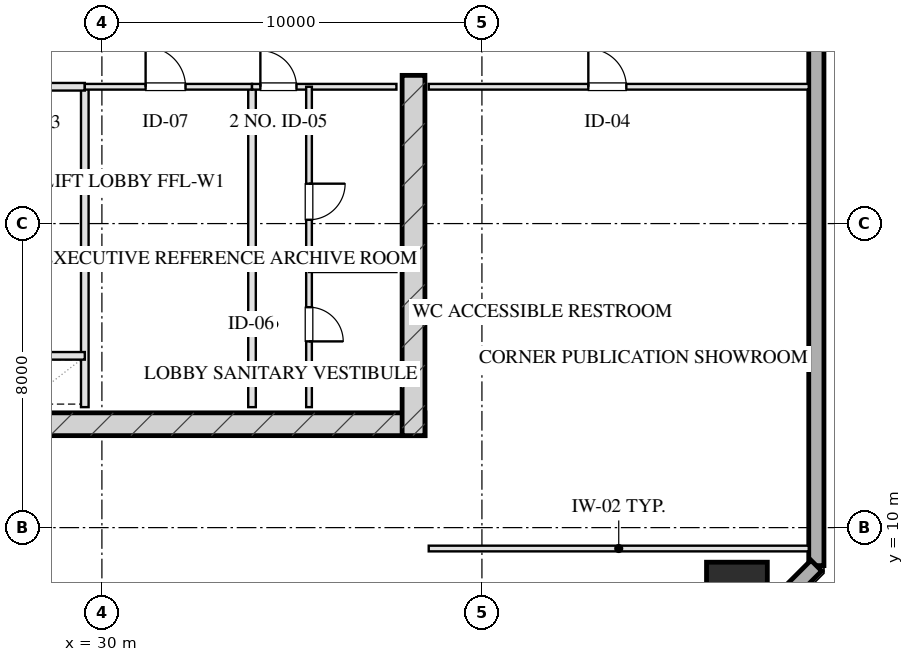
"""IFC4 building model, lengths in metres.
Left out: names, types, materials, properties, quantities, classifications, styles, units other than length and angle.
Written with IfcOpenShell. Run it as: python <this file> out.ifc"""

import sys

from ifc_helpers import new_model, si_unit, direction, frame, frame_2d, origin, origin_2d, place, context, subcontext, project, spatial, rectangle, hollow_rectangle, extrude, element, fill, save


model = new_model("IFC4")
c1 = context("Model", 3, precision=1e-05, world=origin(), true_north=direction((0.0, 1.0)))
c2 = subcontext(c1, "Body", "Model", "MODEL_VIEW")
j1 = project(units=[si_unit("LENGTHUNIT", "METRE"), si_unit("PLANEANGLEUNIT", "RADIAN")], contexts=[c1])
p1 = place(None, origin())
s1 = spatial("IfcSite", under=j1, at=p1, CompositionType="ELEMENT")
p2 = place(p1, origin())
s2 = spatial("IfcBuilding", under=s1, at=p2, CompositionType="ELEMENT")
p3 = place(p2, frame((0.0, 0.0, 117.3)))
s3 = spatial("IfcBuildingStorey", under=s2, at=p3, CompositionType="ELEMENT", Elevation=117.3)
p4 = place(p3, frame((21.5, 12.72, 0.0), z_axis=(0.0, 0.0, 1.0), x_axis=(1.0, 0.0, 0.0)))
e1 = element("IfcWall", 1, at=p4, inside=s3, PredefinedType="SHEAR", context=c2, shape_type="SweptSolid", body=[
    extrude(rectangle(XDim=17.0, YDim=0.6, at=frame_2d((8.5, 0.0))), origin(), (0.0, 0.0, 1.0), 3.45),
])
p5 = place(p3, frame((38.2, 21.9, 0.0), z_axis=(0.0, 0.0, 1.0), x_axis=(0.0, -1.0, 0.0)))
e2 = element("IfcWall", 2, at=p5, inside=s3, PredefinedType="SHEAR", context=c2, shape_type="SweptSolid", body=[
    extrude(rectangle(XDim=9.48, YDim=0.6, at=frame_2d((4.74, 0.0))), origin(), (0.0, 0.0, 1.0), 3.45),
])
p6 = place(p3, frame((46.71, 8.29, 0.0), z_axis=(0.0, 0.0, 1.0), x_axis=(1.0, 0.0, 0.0)))
e3 = element("IfcColumn", 3, at=p6, inside=s3, PredefinedType="COLUMN", context=c2, shape_type="SweptSolid", body=[
    extrude(hollow_rectangle(XDim=1.6, YDim=1.6, WallThickness=0.055, at=origin_2d()), origin(), (0.0, 0.0, 1.0), 3.451),
])
p7 = place(p3, frame((48.8, 59.0, 0.0), z_axis=(0.0, 0.0, 1.0), x_axis=(0.0, -1.0, 0.0)))
e4 = element("IfcWall", 4, at=p7, inside=s3, PredefinedType="SOLIDWALL", context=c2, shape_type="SweptSolid", body=[
    extrude(rectangle(XDim=50.0, YDim=0.4, at=frame_2d((25.0, 0.0))), origin(), (0.0, 0.0, 1.0), 2.61),
])
p8 = place(p7, frame((21.2, 0.0, 0.75)))
e5 = element("IfcOpeningElement", 5, at=p8, cuts=e4, PredefinedType="OPENING", context=c2, shape_type="SweptSolid", body=[
    extrude(rectangle(XDim=2.4, YDim=1.46, at=frame_2d((1.2, 0.73))), frame((0.0, 0.21, 0.0), z_axis=(0.0, -1.0, 0.0), x_axis=(1.0, 0.0, 0.0)), (0.0, 0.0, 1.0), 0.42),
])
p9 = place(p3, frame((48.8, 9.0, 0.0), z_axis=(0.0, 0.0, 1.0), x_axis=(-0.707106781187, -0.707106781187, 0.0)))
e6 = element("IfcWall", 6, at=p9, inside=s3, PredefinedType="SOLIDWALL", context=c2, shape_type="SweptSolid", body=[
    extrude(rectangle(XDim=3.96, YDim=0.4, at=frame_2d((1.98, 0.0))), origin(), (0.0, 0.0, 1.0), 2.61),
])
p10 = place(p3, frame((29.55, 21.6, 0.0), z_axis=(0.0, 0.0, 1.0), x_axis=(0.0, -1.0, 0.0)))
e7 = element("IfcWall", 7, at=p10, inside=s3, PredefinedType="PARTITIONING", context=c2, shape_type="SweptSolid", body=[
    extrude(rectangle(XDim=8.43, YDim=0.2, at=frame_2d((4.215, 0.0))), origin(), (0.0, 0.0, 1.0), 3.175),
])
p11 = place(p3, frame((25.72, 21.6, 0.0), z_axis=(0.0, 0.0, 1.0), x_axis=(1.0, 0.0, 0.0)))
e8 = element("IfcWall", 8, at=p11, inside=s3, PredefinedType="PARTITIONING", context=c2, shape_type="SweptSolid", body=[
    extrude(rectangle(XDim=3.83, YDim=0.2, at=frame_2d((1.915, 0.0))), origin(), (0.0, 0.0, 1.0), 3.175),
])
p12 = place(p11, frame((1.35, 0.0, 0.0)))
e9 = element("IfcOpeningElement", 9, at=p12, cuts=e8, PredefinedType="OPENING", context=c2, shape_type="SweptSolid", body=[
    extrude(rectangle(XDim=1.2, YDim=2.05, at=frame_2d((0.6, 1.025))), frame((0.0, 0.11, 0.0), z_axis=(0.0, -1.0, 0.0), x_axis=(1.0, 0.0, 0.0)), (0.0, 0.0, 1.0), 0.22),
])
p13 = place(p3, frame((27.82, 14.52, 0.0), z_axis=(0.0, 0.0, 1.0), x_axis=(1.0, 0.0, 0.0)))
e10 = element("IfcWall", 10, at=p13, inside=s3, PredefinedType="PARTITIONING", context=c2, shape_type="SweptSolid", body=[
    extrude(rectangle(XDim=1.73, YDim=0.2, at=frame_2d((0.865, 0.0))), origin(), (0.0, 0.0, 1.0), 3.175),
])
p14 = place(p3, frame((33.95, 21.6, 0.0), z_axis=(0.0, 0.0, 1.0), x_axis=(0.0, -1.0, 0.0)))
e11 = element("IfcWall", 11, at=p14, inside=s3, PredefinedType="PARTITIONING", context=c2, shape_type="SweptSolid", body=[
    extrude(rectangle(XDim=8.43, YDim=0.2, at=frame_2d((4.215, 0.0))), origin(), (0.0, 0.0, 1.0), 3.175),
])
p15 = place(p3, frame((29.55, 21.6, 0.0), z_axis=(0.0, 0.0, 1.0), x_axis=(1.0, 0.0, 0.0)))
e12 = element("IfcWall", 12, at=p15, inside=s3, PredefinedType="PARTITIONING", context=c2, shape_type="SweptSolid", body=[
    extrude(rectangle(XDim=4.4, YDim=0.15, at=frame_2d((2.2, 0.0))), origin(), (0.0, 0.0, 1.0), 3.175),
])
p16 = place(p15, frame((1.6, 0.0, 0.0)))
e13 = element("IfcOpeningElement", 13, at=p16, cuts=e12, PredefinedType="OPENING", context=c2, shape_type="SweptSolid", body=[
    extrude(rectangle(XDim=1.05, YDim=2.05, at=frame_2d((0.525, 1.025))), frame((0.0, 0.085, 0.0), z_axis=(0.0, -1.0, 0.0), x_axis=(1.0, 0.0, 0.0)), (0.0, 0.0, 1.0), 0.17),
])
p17 = place(p3, frame((33.95, 21.6, 0.0), z_axis=(0.0, 0.0, 1.0), x_axis=(1.0, 0.0, 0.0)))
e14 = element("IfcWall", 14, at=p17, inside=s3, PredefinedType="PARTITIONING", context=c2, shape_type="SweptSolid", body=[
    extrude(rectangle(XDim=3.8, YDim=0.15, at=frame_2d((1.9, 0.0))), origin(), (0.0, 0.0, 1.0), 3.175),
])
p18 = place(p17, frame((0.22, 0.0, 0.0)))
e15 = element("IfcOpeningElement", 15, at=p18, cuts=e14, PredefinedType="OPENING", context=c2, shape_type="SweptSolid", body=[
    extrude(rectangle(XDim=0.95, YDim=2.05, at=frame_2d((0.475, 1.025))), frame((0.0, 0.085, 0.0), z_axis=(0.0, -1.0, 0.0), x_axis=(1.0, 0.0, 0.0)), (0.0, 0.0, 1.0), 0.17),
])
p19 = place(p3, frame((35.45, 21.6, 0.0), z_axis=(0.0, 0.0, 1.0), x_axis=(0.0, -1.0, 0.0)))
e16 = element("IfcWall", 16, at=p19, inside=s3, PredefinedType="PARTITIONING", context=c2, shape_type="SweptSolid", body=[
    extrude(rectangle(XDim=8.43, YDim=0.15, at=frame_2d((4.215, 0.0))), origin(), (0.0, 0.0, 1.0), 2.765),
])
p20 = place(p19, frame((2.55, 0.0, 0.0)))
e17 = element("IfcOpeningElement", 17, at=p20, cuts=e16, PredefinedType="OPENING", context=c2, shape_type="SweptSolid", body=[
    extrude(rectangle(XDim=0.95, YDim=2.05, at=frame_2d((0.475, 1.025))), frame((0.0, 0.085, 0.0), z_axis=(0.0, -1.0, 0.0), x_axis=(1.0, 0.0, 0.0)), (0.0, 0.0, 1.0), 0.17),
])
p21 = place(p19, frame((5.8, 0.0, 0.0)))
e18 = element("IfcOpeningElement", 18, at=p21, cuts=e16, PredefinedType="OPENING", context=c2, shape_type="SweptSolid", body=[
    extrude(rectangle(XDim=0.9, YDim=2.05, at=frame_2d((0.45, 1.025))), frame((0.0, 0.085, 0.0), z_axis=(0.0, -1.0, 0.0), x_axis=(1.0, 0.0, 0.0)), (0.0, 0.0, 1.0), 0.17),
])
p22 = place(p3, frame((35.45, 16.8, 0.0), z_axis=(0.0, 0.0, 1.0), x_axis=(1.0, 0.0, 0.0)))
e19 = element("IfcWall", 19, at=p22, inside=s3, PredefinedType="PARTITIONING", context=c2, shape_type="SweptSolid", body=[
    extrude(rectangle(XDim=2.3, YDim=0.15, at=frame_2d((1.15, 0.0))), origin(), (0.0, 0.0, 1.0), 3.175),
])
p23 = place(p3, frame((38.6, 9.45, 0.0), z_axis=(0.0, 0.0, 1.0), x_axis=(1.0, 0.0, 0.0)))
e20 = element("IfcWall", 20, at=p23, inside=s3, PredefinedType="PARTITIONING", context=c2, shape_type="SweptSolid", body=[
    extrude(rectangle(XDim=10.0, YDim=0.15, at=frame_2d((5.0, 0.0))), origin(), (0.0, 0.0, 1.0), 3.175),
])
p24 = place(p3, frame((38.6, 21.6, 0.0), z_axis=(0.0, 0.0, 1.0), x_axis=(1.0, 0.0, 0.0)))
e21 = element("IfcWall", 21, at=p24, inside=s3, PredefinedType="PARTITIONING", context=c2, shape_type="SweptSolid", body=[
    extrude(rectangle(XDim=10.0, YDim=0.15, at=frame_2d((5.0, 0.0))), origin(), (0.0, 0.0, 1.0), 3.175),
])
p25 = place(p24, frame((4.2, 0.0, 0.0)))
e22 = element("IfcOpeningElement", 22, at=p25, cuts=e21, PredefinedType="OPENING", context=c2, shape_type="SweptSolid", body=[
    extrude(rectangle(XDim=1.0, YDim=2.05, at=frame_2d((0.5, 1.025))), frame((0.0, 0.085, 0.0), z_axis=(0.0, -1.0, 0.0), x_axis=(1.0, 0.0, 0.0)), (0.0, 0.0, 1.0), 0.17),
])
p26 = place(p16, origin())
e23 = element("IfcDoor", 23, at=p26, inside=s3, OperationType="SINGLE_SWING_LEFT", PredefinedType="DOOR", context=c2, shape_type="SweptSolid", body=[
    extrude(rectangle(XDim=1.05, YDim=2.05, at=frame_2d((0.525, 1.025))), frame((0.0, 0.025, 0.0), z_axis=(0.0, -1.0, 0.0), x_axis=(1.0, 0.0, 0.0)), (0.0, 0.0, 1.0), 0.05),
])
fill(e13, e23)
p27 = place(p18, origin())
e24 = element("IfcDoor", 24, at=p27, inside=s3, OperationType="SINGLE_SWING_LEFT", PredefinedType="DOOR", context=c2, shape_type="SweptSolid", body=[
    extrude(rectangle(XDim=0.95, YDim=2.05, at=frame_2d((0.475, 1.025))), frame((0.0, 0.025, 0.0), z_axis=(0.0, -1.0, 0.0), x_axis=(1.0, 0.0, 0.0)), (0.0, 0.0, 1.0), 0.05),
])
fill(e15, e24)
p28 = place(p20, origin())
e25 = element("IfcDoor", 25, at=p28, inside=s3, OperationType="SINGLE_SWING_LEFT", PredefinedType="DOOR", context=c2, shape_type="SweptSolid", body=[
    extrude(rectangle(XDim=0.95, YDim=2.05, at=frame_2d((0.475, 1.025))), frame((0.0, 0.025, 0.0), z_axis=(0.0, -1.0, 0.0), x_axis=(1.0, 0.0, 0.0)), (0.0, 0.0, 1.0), 0.05),
])
fill(e17, e25)
p29 = place(p21, origin())
e26 = element("IfcDoor", 26, at=p29, inside=s3, OperationType="SINGLE_SWING_RIGHT", PredefinedType="DOOR", context=c2, shape_type="SweptSolid", body=[
    extrude(rectangle(XDim=0.9, YDim=2.05, at=frame_2d((0.45, 1.025))), frame((0.0, 0.025, 0.0), z_axis=(0.0, -1.0, 0.0), x_axis=(1.0, 0.0, 0.0)), (0.0, 0.0, 1.0), 0.05),
])
fill(e18, e26)
p30 = place(p25, origin())
e27 = element("IfcDoor", 27, at=p30, inside=s3, OperationType="SINGLE_SWING_LEFT", PredefinedType="DOOR", context=c2, shape_type="SweptSolid", body=[
    extrude(rectangle(XDim=1.0, YDim=2.05, at=frame_2d((0.5, 1.025))), frame((0.0, 0.025, 0.0), z_axis=(0.0, -1.0, 0.0), x_axis=(1.0, 0.0, 0.0)), (0.0, 0.0, 1.0), 0.05),
])
fill(e22, e27)
save(model, sys.argv[1])
